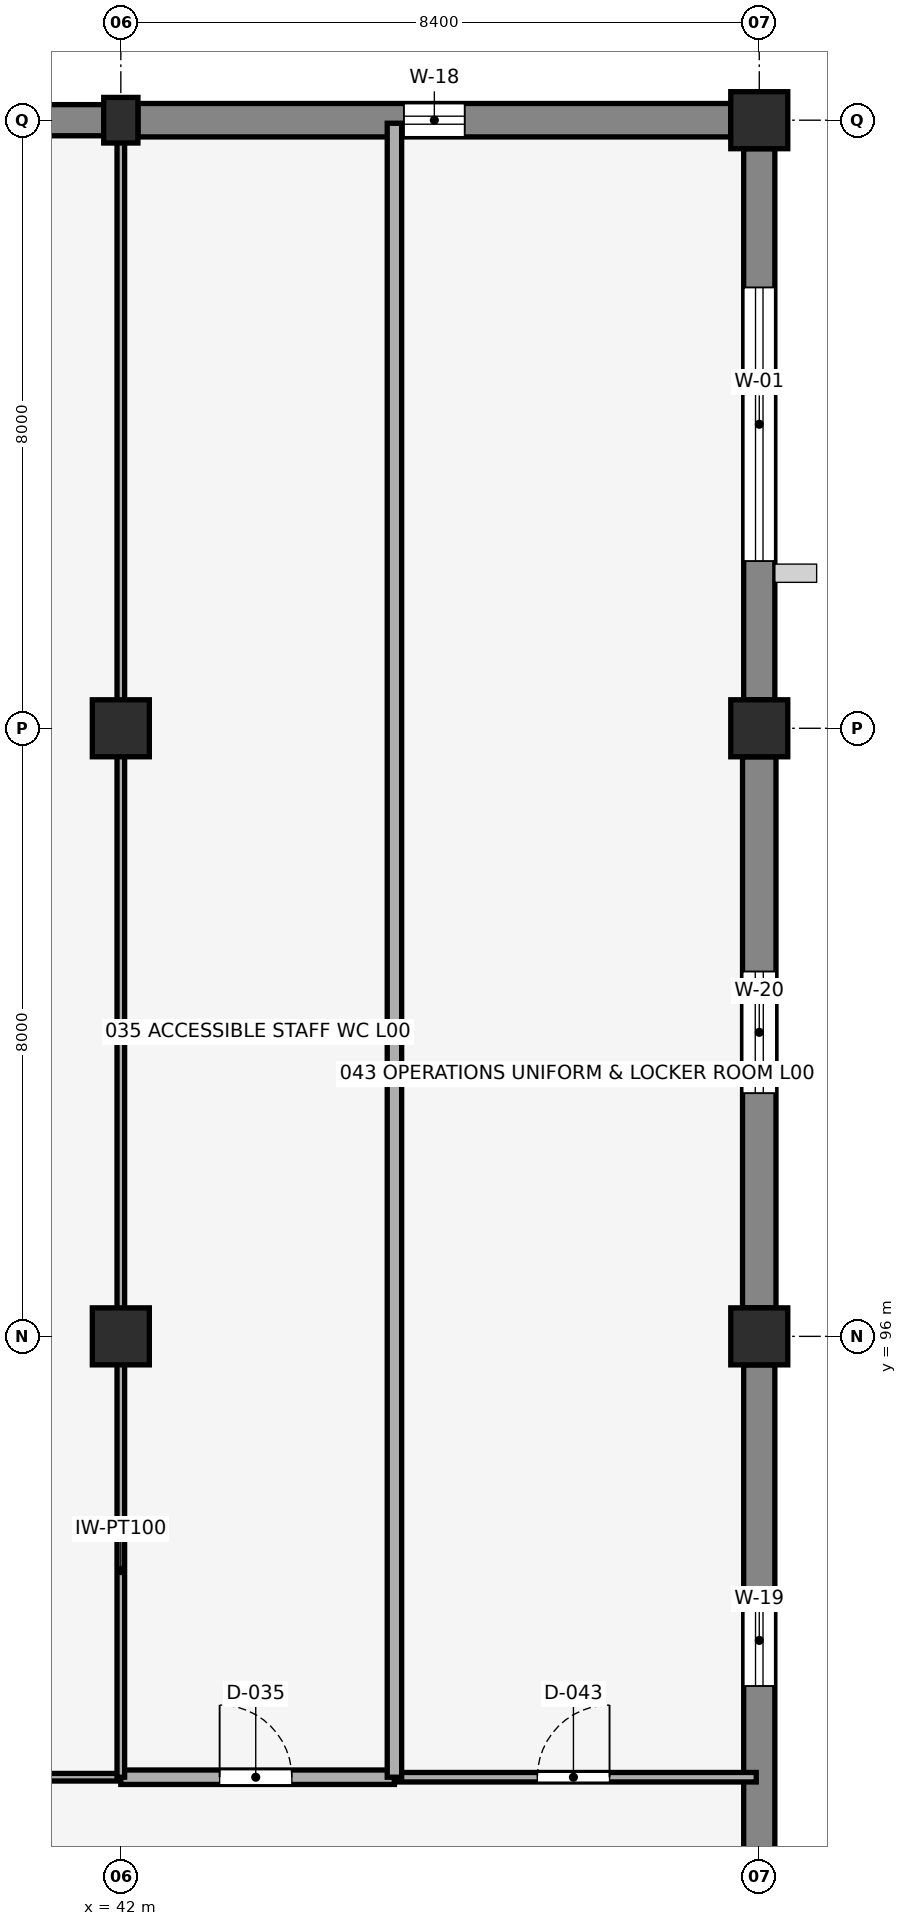
"""IFC4 building model, lengths in metres.
Left out: names, types, materials, properties, quantities, classifications, styles, units other than length and angle.
Written with IfcOpenShell. Run it as: python <this file> out.ifc"""

import sys

from ifc_helpers import new_model, si_unit, direction, frame, frame_2d, origin, origin_2d, place, context, subcontext, project, spatial, rectangle, extrude, element, fill, save


model = new_model("IFC4")
c1 = context("Model", 3, precision=1e-05, world=origin(), true_north=direction((0.0, 1.0)))
c2 = subcontext(c1, "Body", "Model", "MODEL_VIEW")
j1 = project(units=[si_unit("LENGTHUNIT", "METRE"), si_unit("PLANEANGLEUNIT", "RADIAN")], contexts=[c1])
p1 = place(None, origin())
s1 = spatial("IfcSite", under=j1, at=p1, CompositionType="ELEMENT")
p2 = place(p1, origin())
s2 = spatial("IfcBuilding", under=s1, at=p2, CompositionType="ELEMENT")
p3 = place(p2, origin())
s3 = spatial("IfcBuildingStorey", under=s2, at=p3, CompositionType="ELEMENT", Elevation=0.0)
for number, where, z_axis, x_axis in (
    (1, (42.0, 96.0, 0.0), (0.0, 0.0, 1.0), (1.0, 0.0, 0.0)),
    (2, (42.0, 104.0, 0.0), (0.0, 0.0, 1.0), (1.0, 0.0, 0.0)),
):
    element("IfcColumn", number, at=place(p3, frame(where, z_axis=z_axis, x_axis=x_axis)), inside=s3, PredefinedType="COLUMN", context=c2, shape_type="SweptSolid", body=[
        extrude(rectangle(XDim=0.75, YDim=0.75, at=origin_2d()), origin(), (0.0, 0.0, 1.0), 5.15),
    ])
p4 = place(p3, frame((42.0, 112.0, 0.0), z_axis=(0.0, 0.0, 1.0), x_axis=(1.0, 0.0, 0.0)))
e3 = element("IfcColumn", 3, at=p4, inside=s3, PredefinedType="PILASTER", context=c2, shape_type="SweptSolid", body=[
    extrude(rectangle(XDim=0.45, YDim=0.6, at=origin_2d()), origin(), (0.0, 0.0, 1.0), 5.15),
])
for number, where, z_axis, x_axis in (
    (4, (50.4, 96.0, 0.0), (0.0, 0.0, 1.0), (1.0, 0.0, 0.0)),
    (5, (50.4, 104.0, 0.0), (0.0, 0.0, 1.0), (1.0, 0.0, 0.0)),
    (6, (50.4, 112.0, 0.0), (0.0, 0.0, 1.0), (1.0, 0.0, 0.0)),
):
    element("IfcColumn", number, at=place(p3, frame(where, z_axis=z_axis, x_axis=x_axis)), inside=s3, PredefinedType="COLUMN", context=c2, shape_type="SweptSolid", body=[
        extrude(rectangle(XDim=0.75, YDim=0.75, at=origin_2d()), origin(), (0.0, 0.0, 1.0), 5.15),
    ])
p5 = place(p3, frame((33.975, 112.0, 0.0), z_axis=(0.0, 0.0, 1.0), x_axis=(1.0, 0.0, 0.0)))
e7 = element("IfcWall", 7, at=p5, inside=s3, PredefinedType="SOLIDWALL", context=c2, shape_type="SweptSolid", body=[
    extrude(rectangle(XDim=7.8, YDim=0.41, at=frame_2d((3.9, 0.0))), origin(), (0.0, 0.0, 1.0), 4.74),
])
p6 = place(p5, frame((3.425, 0.0, 0.65), z_axis=(0.0, 0.0, 1.0), x_axis=(1.0, 0.0, 0.0)))
e8 = element("IfcOpeningElement", 8, at=p6, cuts=e7, PredefinedType="OPENING", context=c2, shape_type="SweptSolid", body=[
    extrude(rectangle(XDim=0.95, YDim=2.1, at=frame_2d((0.475, 1.05))), frame((0.0, 0.215, 0.0), z_axis=(0.0, -1.0, 0.0), x_axis=(1.0, 0.0, 0.0)), (0.0, 0.0, 1.0), 0.43),
])
p7 = place(p3, frame((42.225, 112.0, 0.0), z_axis=(0.0, 0.0, 1.0), x_axis=(1.0, 0.0, 0.0)))
e9 = element("IfcWall", 9, at=p7, inside=s3, PredefinedType="SOLIDWALL", context=c2, shape_type="SweptSolid", body=[
    extrude(rectangle(XDim=7.8, YDim=0.44, at=frame_2d((3.9, 0.0))), origin(), (0.0, 0.0, 1.0), 4.74),
])
p8 = place(p7, frame((3.5, 0.0, 0.65), z_axis=(0.0, 0.0, 1.0), x_axis=(1.0, 0.0, 0.0)))
e10 = element("IfcOpeningElement", 10, at=p8, cuts=e9, PredefinedType="OPENING", context=c2, shape_type="SweptSolid", body=[
    extrude(rectangle(XDim=0.8, YDim=1.85, at=frame_2d((0.4, 0.925))), frame((0.0, 0.23, 0.0), z_axis=(0.0, -1.0, 0.0), x_axis=(1.0, 0.0, 0.0)), (0.0, 0.0, 1.0), 0.46),
])
p9 = place(p3, frame((50.4, 88.375, 0.0), z_axis=(0.0, 0.0, 1.0), x_axis=(0.0, 1.0, 0.0)))
e11 = element("IfcWall", 11, at=p9, inside=s3, PredefinedType="SOLIDWALL", context=c2, shape_type="SweptSolid", body=[
    extrude(rectangle(XDim=7.25, YDim=0.41, at=frame_2d((3.625, 0.0))), origin(), (0.0, 0.0, 1.0), 4.747),
])
p10 = place(p9, frame((3.025, 0.0, 1.55), z_axis=(0.0, 0.0, 1.0), x_axis=(1.0, 0.0, 0.0)))
e12 = element("IfcOpeningElement", 12, at=p10, cuts=e11, PredefinedType="OPENING", context=c2, shape_type="SweptSolid", body=[
    extrude(rectangle(XDim=1.2, YDim=0.95, at=frame_2d((0.6, 0.475))), frame((0.0, 0.215, 0.0), z_axis=(0.0, -1.0, 0.0), x_axis=(1.0, 0.0, 0.0)), (0.0, 0.0, 1.0), 0.43),
])
p11 = place(p3, frame((50.4, 96.375, 0.0), z_axis=(0.0, 0.0, 1.0), x_axis=(0.0, 1.0, 0.0)))
e13 = element("IfcWall", 13, at=p11, inside=s3, PredefinedType="SOLIDWALL", context=c2, shape_type="SweptSolid", body=[
    extrude(rectangle(XDim=7.25, YDim=0.44, at=frame_2d((3.625, 0.0))), origin(), (0.0, 0.0, 1.0), 4.747),
])
p12 = place(p11, frame((2.825, 0.0, 0.9), z_axis=(0.0, 0.0, 1.0), x_axis=(1.0, 0.0, 0.0)))
e14 = element("IfcOpeningElement", 14, at=p12, cuts=e13, PredefinedType="OPENING", context=c2, shape_type="SweptSolid", body=[
    extrude(rectangle(XDim=1.6, YDim=1.2, at=frame_2d((0.8, 0.6))), frame((0.0, 0.23, 0.0), z_axis=(0.0, -1.0, 0.0), x_axis=(1.0, 0.0, 0.0)), (0.0, 0.0, 1.0), 0.46),
])
p13 = place(p3, frame((50.4, 104.375, 0.0), z_axis=(0.0, 0.0, 1.0), x_axis=(0.0, 1.0, 0.0)))
e15 = element("IfcWall", 15, at=p13, inside=s3, PredefinedType="SOLIDWALL", context=c2, shape_type="SweptSolid", body=[
    extrude(rectangle(XDim=7.25, YDim=0.41, at=frame_2d((3.625, 0.0))), origin(), (0.0, 0.0, 1.0), 4.747),
])
p14 = place(p13, frame((1.825, 0.0, 0.9), z_axis=(0.0, 0.0, 1.0), x_axis=(1.0, 0.0, 0.0)))
e16 = element("IfcOpeningElement", 16, at=p14, cuts=e15, PredefinedType="OPENING", context=c2, shape_type="SweptSolid", body=[
    extrude(rectangle(XDim=3.6, YDim=1.8, at=frame_2d((1.8, 0.9))), frame((0.0, 0.215, 0.0), z_axis=(0.0, -1.0, 0.0), x_axis=(1.0, 0.0, 0.0)), (0.0, 0.0, 1.0), 0.43),
])
p15 = place(p3, frame((16.8, 90.2, 0.0), z_axis=(0.0, 0.0, 1.0), x_axis=(1.0, 0.0, 0.0)))
e17 = element("IfcWall", 17, at=p15, inside=s3, PredefinedType="PARTITIONING", context=c2, shape_type="SweptSolid", body=[
    extrude(rectangle(XDim=25.2, YDim=0.1, at=frame_2d((12.6, 0.0))), origin(), (0.0, 0.0, 1.0), 4.542),
])
p16 = place(p15, frame((3.7, 0.0, 0.0), z_axis=(0.0, 0.0, 1.0), x_axis=(1.0, 0.0, 0.0)))
e18 = element("IfcOpeningElement", 18, at=p16, cuts=e17, PredefinedType="OPENING", context=c2, shape_type="SweptSolid", body=[
    extrude(rectangle(XDim=0.92, YDim=2.12, at=frame_2d((0.46, 1.06))), frame((0.0, 0.06, 0.0), z_axis=(0.0, -1.0, 0.0), x_axis=(1.0, 0.0, 0.0)), (0.0, 0.0, 1.0), 0.12),
])
p17 = place(p3, frame((42.0, 90.2, 0.0), z_axis=(0.0, 0.0, 1.0), x_axis=(1.0, 0.0, 0.0)))
e19 = element("IfcWall", 19, at=p17, inside=s3, PredefinedType="PLUMBINGWALL", context=c2, shape_type="SweptSolid", body=[
    extrude(rectangle(XDim=3.6, YDim=0.19, at=frame_2d((1.8, 0.0))), origin(), (0.0, 0.0, 1.0), 5.15),
])
p18 = place(p17, frame((1.3, 0.0, 0.0), z_axis=(0.0, 0.0, 1.0), x_axis=(1.0, 0.0, 0.0)))
e20 = element("IfcOpeningElement", 20, at=p18, cuts=e19, PredefinedType="OPENING", context=c2, shape_type="SweptSolid", body=[
    extrude(rectangle(XDim=0.95, YDim=2.15, at=frame_2d((0.475, 1.075))), frame((0.0, 0.105, 0.0), z_axis=(0.0, -1.0, 0.0), x_axis=(1.0, 0.0, 0.0)), (0.0, 0.0, 1.0), 0.21),
])
p19 = place(p3, frame((45.6, 90.2, 0.0), z_axis=(0.0, 0.0, 1.0), x_axis=(1.0, 0.0, 0.0)))
e21 = element("IfcWall", 21, at=p19, inside=s3, PredefinedType="PARTITIONING", context=c2, shape_type="SweptSolid", body=[
    extrude(rectangle(XDim=4.76, YDim=0.125, at=frame_2d((2.38, 0.0))), origin(), (0.0, 0.0, 1.0), 5.15),
])
p20 = place(p19, frame((1.88, 0.0, 0.0), z_axis=(0.0, 0.0, 1.0), x_axis=(1.0, 0.0, 0.0)))
e22 = element("IfcOpeningElement", 22, at=p20, cuts=e21, PredefinedType="OPENING", context=c2, shape_type="SweptSolid", body=[
    extrude(rectangle(XDim=0.95, YDim=2.15, at=frame_2d((0.475, 1.075))), frame((0.0, 0.073, 0.0), z_axis=(0.0, -1.0, 0.0), x_axis=(1.0, 0.0, 0.0)), (0.0, 0.0, 1.0), 0.145),
])
p21 = place(p3, frame((42.0, 90.2, 0.0), z_axis=(0.0, 0.0, 1.0), x_axis=(0.0, 1.0, 0.0)))
e23 = element("IfcWall", 23, at=p21, inside=s3, PredefinedType="PARTITIONING", context=c2, shape_type="SweptSolid", body=[
    extrude(rectangle(XDim=5.435, YDim=0.1, at=frame_2d((2.718, 0.0))), origin(), (0.0, 0.0, 1.0), 4.542),
])
p22 = place(p3, frame((42.0, 96.365, 0.0), z_axis=(0.0, 0.0, 1.0), x_axis=(0.0, 1.0, 0.0)))
e24 = element("IfcWall", 24, at=p22, inside=s3, PredefinedType="PARTITIONING", context=c2, shape_type="SweptSolid", body=[
    extrude(rectangle(XDim=7.27, YDim=0.1, at=frame_2d((3.635, 0.0))), origin(), (0.0, 0.0, 1.0), 4.542),
])
p23 = place(p3, frame((42.0, 104.365, 0.0), z_axis=(0.0, 0.0, 1.0), x_axis=(0.0, 1.0, 0.0)))
e25 = element("IfcWall", 25, at=p23, inside=s3, PredefinedType="PARTITIONING", context=c2, shape_type="SweptSolid", body=[
    extrude(rectangle(XDim=7.345, YDim=0.1, at=frame_2d((3.672, 0.0))), origin(), (0.0, 0.0, 1.0), 4.542),
])
p24 = place(p3, frame((45.6, 90.2, 0.0), z_axis=(0.0, 0.0, 1.0), x_axis=(0.0, 1.0, 0.0)))
e26 = element("IfcWall", 26, at=p24, inside=s3, PredefinedType="PLUMBINGWALL", context=c2, shape_type="SweptSolid", body=[
    extrude(rectangle(XDim=21.76, YDim=0.19, at=frame_2d((10.88, 0.0))), origin(), (0.0, 0.0, 1.0), 5.15),
])
p25 = place(p8, origin())
e27 = element("IfcWindow", 27, at=p25, inside=s3, PartitioningType="SINGLE_PANEL", PredefinedType="WINDOW", context=c2, shape_type="SweptSolid", body=[
    extrude(rectangle(XDim=0.8, YDim=1.85, at=frame_2d((0.4, 0.925))), frame((0.0, 0.03, 0.0), z_axis=(0.0, -1.0, 0.0), x_axis=(1.0, 0.0, 0.0)), (0.0, 0.0, 1.0), 0.06),
])
fill(e10, e27)
p26 = place(p10, origin())
e28 = element("IfcWindow", 28, at=p26, inside=s3, PartitioningType="SINGLE_PANEL", PredefinedType="WINDOW", context=c2, shape_type="SweptSolid", body=[
    extrude(rectangle(XDim=1.2, YDim=0.95, at=frame_2d((0.6, 0.475))), frame((0.0, 0.03, 0.0), z_axis=(0.0, -1.0, 0.0), x_axis=(1.0, 0.0, 0.0)), (0.0, 0.0, 1.0), 0.06),
])
fill(e12, e28)
p27 = place(p12, origin())
e29 = element("IfcWindow", 29, at=p27, inside=s3, PartitioningType="DOUBLE_PANEL_VERTICAL", PredefinedType="WINDOW", context=c2, shape_type="SweptSolid", body=[
    extrude(rectangle(XDim=1.6, YDim=1.2, at=frame_2d((0.8, 0.6))), frame((0.0, 0.03, 0.0), z_axis=(0.0, -1.0, 0.0), x_axis=(1.0, 0.0, 0.0)), (0.0, 0.0, 1.0), 0.06),
])
fill(e14, e29)
p28 = place(p14, origin())
e30 = element("IfcWindow", 30, at=p28, inside=s3, PartitioningType="TRIPLE_PANEL_VERTICAL", PredefinedType="WINDOW", context=c2, shape_type="SweptSolid", body=[
    extrude(rectangle(XDim=3.6, YDim=1.8, at=frame_2d((1.8, 0.9))), frame((0.0, 0.03, 0.0), z_axis=(0.0, -1.0, 0.0), x_axis=(1.0, 0.0, 0.0)), (0.0, 0.0, 1.0), 0.06),
])
fill(e16, e30)
p29 = place(p18, origin())
e31 = element("IfcDoor", 31, at=p29, inside=s3, OperationType="SINGLE_SWING_LEFT", PredefinedType="DOOR", context=c2, shape_type="SweptSolid", body=[
    extrude(rectangle(XDim=0.95, YDim=2.15, at=frame_2d((0.475, 1.075))), frame((0.0, 0.025, 0.0), z_axis=(0.0, -1.0, 0.0), x_axis=(1.0, 0.0, 0.0)), (0.0, 0.0, 1.0), 0.05),
])
fill(e20, e31)
p30 = place(p20, origin())
e32 = element("IfcDoor", 32, at=p30, inside=s3, OperationType="SINGLE_SWING_RIGHT", PredefinedType="DOOR", context=c2, shape_type="SweptSolid", body=[
    extrude(rectangle(XDim=0.95, YDim=2.15, at=frame_2d((0.475, 1.075))), frame((0.0, 0.025, 0.0), z_axis=(0.0, -1.0, 0.0), x_axis=(1.0, 0.0, 0.0)), (0.0, 0.0, 1.0), 0.05),
])
fill(e22, e32)
save(model, sys.argv[1])
